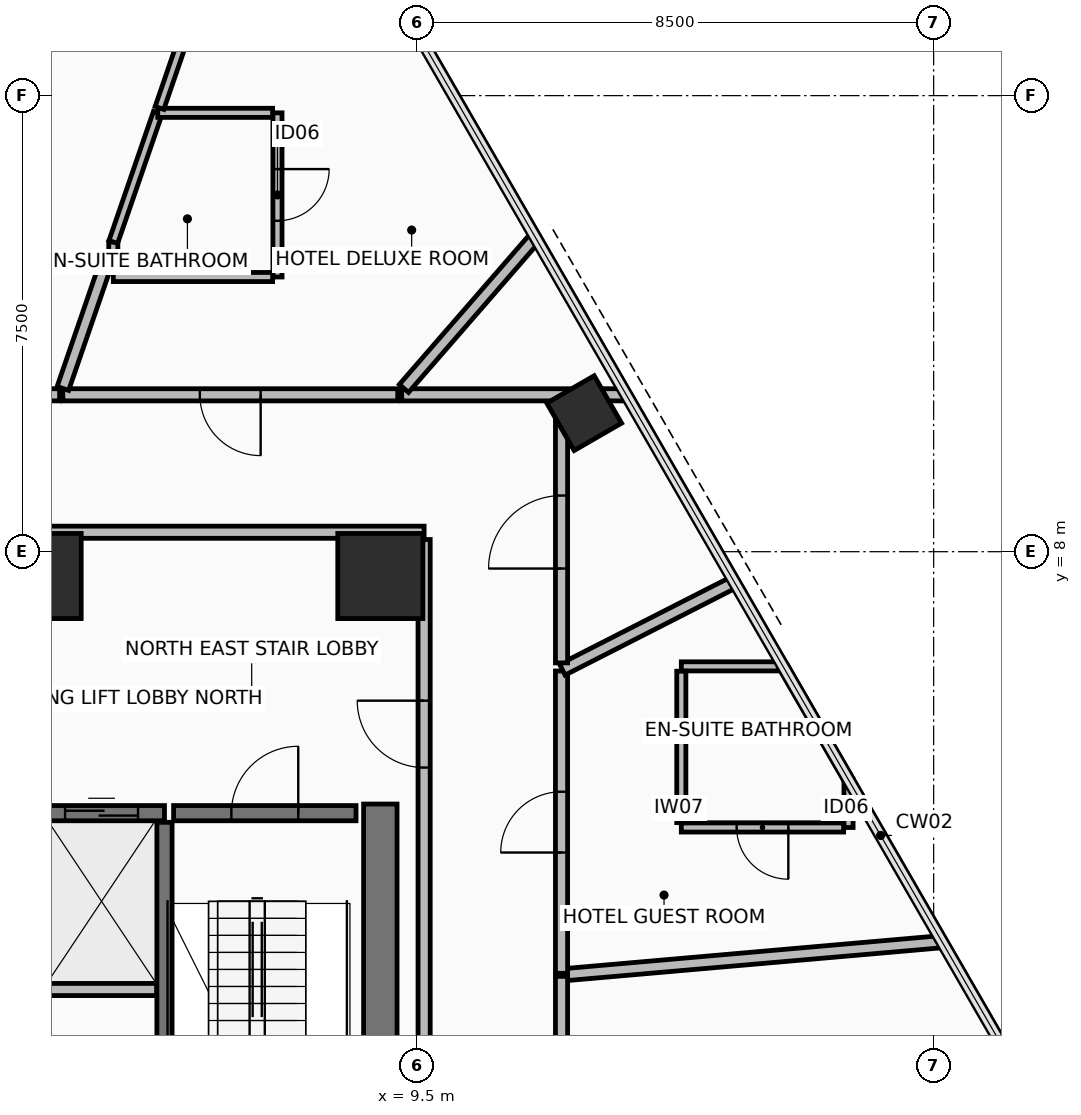
"""IFC4 building model, lengths in metres.
Left out: names, types, materials, properties, quantities, classifications, styles, units other than length and angle.
Written with IfcOpenShell. Run it as: python <this file> out.ifc"""

import sys

from ifc_helpers import new_model, si_unit, direction, frame, frame_2d, origin, origin_2d, place, context, subcontext, project, spatial, rectangle, hollow_rectangle, extrude, element, fill, save


model = new_model("IFC4")
c1 = context("Model", 3, precision=1e-05, world=origin(), true_north=direction((0.0, 1.0)))
c2 = subcontext(c1, "Body", "Model", "MODEL_VIEW")
j1 = project(units=[si_unit("LENGTHUNIT", "METRE"), si_unit("PLANEANGLEUNIT", "RADIAN")], contexts=[c1])
p1 = place(None, origin())
s1 = spatial("IfcSite", under=j1, at=p1, CompositionType="ELEMENT")
p2 = place(p1, origin())
s2 = spatial("IfcBuilding", under=s1, at=p2, CompositionType="ELEMENT")
p3 = place(p2, frame((0.0, 0.0, 38.65)))
s3 = spatial("IfcBuildingStorey", under=s2, at=p3, CompositionType="ELEMENT", Elevation=38.65)
for number, where, z_axis, x_axis in (
    (1, (8.9, 7.6, 0.0), (0.0, 0.0, 1.0), (1.0, 0.0, 0.0)),
    (2, (3.28, 7.6, 0.0), (0.0, 0.0, 1.0), (1.0, 0.0, 0.0)),
):
    element("IfcColumn", number, at=place(p3, frame(where, z_axis=z_axis, x_axis=x_axis)), inside=s3, PredefinedType="COLUMN", context=c2, shape_type="SweptSolid", body=[
        extrude(rectangle(XDim=1.4, YDim=1.4, at=origin_2d()), origin(), (0.0, 0.0, 1.0), 3.4),
    ])
p4 = place(p3, frame((12.252, 10.279, 0.0), z_axis=(0.0, 0.0, 1.0), x_axis=(-0.500001511499, 0.866024531118, 0.0)))
e3 = element("IfcColumn", 3, at=p4, inside=s3, PredefinedType="COLUMN", context=c2, shape_type="SweptSolid", body=[
    extrude(hollow_rectangle(XDim=0.9, YDim=0.9, WallThickness=0.05, at=origin_2d()), origin(), (0.0, 0.0, 1.0), 3.4),
])
p5 = place(p3, frame((8.9, -6.85, 0.0), z_axis=(0.0, 0.0, 1.0), x_axis=(0.0, 1.0, 0.0)))
e4 = element("IfcWall", 4, at=p5, inside=s3, PredefinedType="SHEAR", context=c2, shape_type="SweptSolid", body=[
    extrude(rectangle(XDim=10.7, YDim=0.55, at=frame_2d((5.35, 0.0))), origin(), (0.0, 0.0, 1.0), 3.225),
])
p6 = place(p3, frame((9.62, 8.32, 0.0), z_axis=(0.0, 0.0, 1.0), x_axis=(-1.0, 0.0, 0.0)))
e5 = element("IfcWall", 5, at=p6, inside=s3, PredefinedType="PARTITIONING", context=c2, shape_type="SweptSolid", body=[
    extrude(rectangle(XDim=19.24, YDim=0.2, at=frame_2d((9.62, 0.0))), origin(), (0.0, 0.0, 1.0), 2.57),
])
p7 = place(p6, frame((16.245, 0.0, 0.0)))
e6 = element("IfcOpeningElement", 6, at=p7, cuts=e5, PredefinedType="OPENING", context=c2, shape_type="SweptSolid", body=[
    extrude(rectangle(XDim=0.9, YDim=2.1, at=frame_2d((0.45, 1.05))), frame((0.0, 0.11, 0.0), z_axis=(0.0, -1.0, 0.0), x_axis=(1.0, 0.0, 0.0)), (0.0, 0.0, 1.0), 0.22),
])
p8 = place(p6, frame((14.295, 0.0, 0.0)))
e7 = element("IfcOpeningElement", 7, at=p8, cuts=e5, PredefinedType="OPENING", context=c2, shape_type="SweptSolid", body=[
    extrude(rectangle(XDim=0.9, YDim=2.1, at=frame_2d((0.45, 1.05))), frame((0.0, 0.11, 0.0), z_axis=(0.0, -1.0, 0.0), x_axis=(1.0, 0.0, 0.0)), (0.0, 0.0, 1.0), 0.22),
])
p9 = place(p3, frame((9.62, -8.2, 0.0), z_axis=(0.0, 0.0, 1.0), x_axis=(0.0, 1.0, 0.0)))
e8 = element("IfcWall", 8, at=p9, inside=s3, PredefinedType="PARTITIONING", context=c2, shape_type="SweptSolid", body=[
    extrude(rectangle(XDim=16.4, YDim=0.2, at=frame_2d((8.2, 0.0))), origin(), (0.0, 0.0, 1.0), 2.62),
])
p10 = place(p9, frame((12.65, 0.0, 0.0)))
e9 = element("IfcOpeningElement", 9, at=p10, cuts=e8, PredefinedType="OPENING", context=c2, shape_type="SweptSolid", body=[
    extrude(rectangle(XDim=1.1, YDim=2.15, at=frame_2d((0.55, 1.075))), frame((0.0, 0.11, 0.0), z_axis=(0.0, -1.0, 0.0), x_axis=(1.0, 0.0, 0.0)), (0.0, 0.0, 1.0), 0.22),
])
p11 = place(p3, frame((5.35, -3.75, 0.0), z_axis=(0.0, 0.0, 1.0), x_axis=(0.0, 1.0, 0.0)))
e10 = element("IfcWall", 10, at=p11, inside=s3, PredefinedType="SHEAR", context=c2, shape_type="SweptSolid", body=[
    extrude(rectangle(XDim=7.3, YDim=0.25, at=frame_2d((3.65, 0.0))), origin(), (0.0, 0.0, 1.0), 3.225),
])
p12 = place(p3, frame((5.5, 3.7, 0.0), z_axis=(0.0, 0.0, 1.0), x_axis=(1.0, 0.0, 0.0)))
e11 = element("IfcWall", 11, at=p12, inside=s3, PredefinedType="SHEAR", context=c2, shape_type="SweptSolid", body=[
    extrude(rectangle(XDim=3.0, YDim=0.25, at=frame_2d((1.5, 0.0))), origin(), (0.0, 0.0, 1.0), 3.225),
])
p13 = place(p12, frame((0.95, 0.0, 0.0)))
e12 = element("IfcOpeningElement", 12, at=p13, cuts=e11, PredefinedType="OPENING", context=c2, shape_type="SweptSolid", body=[
    extrude(rectangle(XDim=1.1, YDim=2.15, at=frame_2d((0.55, 1.075))), frame((0.0, 0.135, 0.0), z_axis=(0.0, -1.0, 0.0), x_axis=(1.0, 0.0, 0.0)), (0.0, 0.0, 1.0), 0.27),
])
p14 = place(p3, frame((3.28, 3.7, 0.0), z_axis=(0.0, 0.0, 1.0), x_axis=(1.0, 0.0, 0.0)))
e13 = element("IfcWall", 13, at=p14, inside=s3, PredefinedType="SHEAR", context=c2, shape_type="SweptSolid", body=[
    extrude(rectangle(XDim=2.07, YDim=0.25, at=frame_2d((1.035, 0.0))), origin(), (0.0, 0.0, 1.0), 3.225),
])
p15 = place(p14, frame((0.435, 0.0, 0.0)))
e14 = element("IfcOpeningElement", 14, at=p15, cuts=e13, PredefinedType="OPENING", context=c2, shape_type="SweptSolid", body=[
    extrude(rectangle(XDim=1.2, YDim=2.2, at=frame_2d((0.6, 1.1))), frame((0.0, 0.135, 0.0), z_axis=(0.0, -1.0, 0.0), x_axis=(1.0, 0.0, 0.0)), (0.0, 0.0, 1.0), 0.27),
])
p16 = place(p3, frame((3.385, 0.8, 0.0), z_axis=(0.0, 0.0, 1.0), x_axis=(1.0, 0.0, 0.0)))
e15 = element("IfcWall", 15, at=p16, inside=s3, PredefinedType="PARTITIONING", context=c2, shape_type="SweptSolid", body=[
    extrude(rectangle(XDim=1.835, YDim=0.2, at=frame_2d((0.917, 0.0))), origin(), (0.0, 0.0, 1.0), 3.225),
])
p17 = place(p3, frame((13.85, 6.114, 0.0), z_axis=(0.0, 0.0, 1.0), x_axis=(1.0, 0.0, 0.0)))
e16 = element("IfcWall", 16, at=p17, inside=s3, PredefinedType="PARTITIONING", context=c2, shape_type="SweptSolid", body=[
    extrude(rectangle(XDim=1.672, YDim=0.15, at=frame_2d((0.836, 0.0))), origin(), (0.0, 0.0, 1.0), 2.42),
])
p18 = place(p3, frame((15.522, 6.114, 0.0), z_axis=(0.0, 0.0, 1.0), x_axis=(0.500062410969, -0.865989367796, 0.0)))
e17 = element("IfcWall", 17, at=p18, inside=s3, PredefinedType="PARTITIONING", context=c2, shape_type="SweptSolid", body=[
    extrude(rectangle(XDim=2.155, YDim=0.15, at=frame_2d((1.078, 0.0))), origin(), (0.0, 0.0, 1.0), 3.225),
])
p19 = place(p3, frame((16.6, 4.248, 0.0), z_axis=(0.0, 0.0, 1.0), x_axis=(0.0, -1.0, 0.0)))
e18 = element("IfcWall", 18, at=p19, inside=s3, PredefinedType="PARTITIONING", context=c2, shape_type="SweptSolid", body=[
    extrude(rectangle(XDim=0.784, YDim=0.15, at=frame_2d((0.392, 0.0))), origin(), (0.0, 0.0, 1.0), 3.225),
])
p20 = place(p3, frame((16.52, 3.464, 0.0), z_axis=(0.0, 0.0, 1.0), x_axis=(-1.0, 0.0, 0.0)))
e19 = element("IfcWall", 19, at=p20, inside=s3, PredefinedType="PARTITIONING", context=c2, shape_type="SweptSolid", body=[
    extrude(rectangle(XDim=2.67, YDim=0.15, at=frame_2d((1.335, 0.0))), origin(), (0.0, 0.0, 1.0), 2.42),
])
p21 = place(p20, frame((0.91, 0.0, 0.0)))
e20 = element("IfcOpeningElement", 20, at=p21, cuts=e19, PredefinedType="OPENING", context=c2, shape_type="SweptSolid", body=[
    extrude(rectangle(XDim=0.85, YDim=2.1, at=frame_2d((0.425, 1.05))), frame((0.0, 0.085, 0.0), z_axis=(0.0, -1.0, 0.0), x_axis=(1.0, 0.0, 0.0)), (0.0, 0.0, 1.0), 0.17),
])
p22 = place(p3, frame((13.85, 3.544, 0.0), z_axis=(0.0, 0.0, 1.0), x_axis=(0.0, 1.0, 0.0)))
e21 = element("IfcWall", 21, at=p22, inside=s3, PredefinedType="PARTITIONING", context=c2, shape_type="SweptSolid", body=[
    extrude(rectangle(XDim=2.49, YDim=0.15, at=frame_2d((1.245, 0.0))), origin(), (0.0, 0.0, 1.0), 2.82),
])
p23 = place(p3, frame((7.208, 15.217, 0.0), z_axis=(0.0, 0.0, 1.0), x_axis=(0.0, -1.0, 0.0)))
e22 = element("IfcWall", 22, at=p23, inside=s3, PredefinedType="PARTITIONING", context=c2, shape_type="SweptSolid", body=[
    extrude(rectangle(XDim=2.7, YDim=0.15, at=frame_2d((1.35, 0.0))), origin(), (0.0, 0.0, 1.0), 2.82),
])
p24 = place(p23, frame((0.925, 0.0, 0.0)))
e23 = element("IfcOpeningElement", 23, at=p24, cuts=e22, PredefinedType="OPENING", context=c2, shape_type="SweptSolid", body=[
    extrude(rectangle(XDim=0.85, YDim=2.1, at=frame_2d((0.425, 1.05))), frame((0.0, 0.085, 0.0), z_axis=(0.0, -1.0, 0.0), x_axis=(1.0, 0.0, 0.0)), (0.0, 0.0, 1.0), 0.17),
])
p25 = place(p3, frame((7.128, 12.517, 0.0), z_axis=(0.0, 0.0, 1.0), x_axis=(-1.0, 0.0, 0.0)))
e24 = element("IfcWall", 24, at=p25, inside=s3, PredefinedType="PARTITIONING", context=c2, shape_type="SweptSolid", body=[
    extrude(rectangle(XDim=2.62, YDim=0.15, at=frame_2d((1.31, 0.0))), origin(), (0.0, 0.0, 1.0), 2.82),
])
p26 = place(p3, frame((4.508, 12.597, 0.0), z_axis=(0.0, 0.0, 1.0), x_axis=(0.0, 1.0, 0.0)))
e25 = element("IfcWall", 25, at=p26, inside=s3, PredefinedType="PARTITIONING", context=c2, shape_type="SweptSolid", body=[
    extrude(rectangle(XDim=0.496, YDim=0.15, at=frame_2d((0.248, 0.0))), origin(), (0.0, 0.0, 1.0), 3.225),
])
p27 = place(p3, frame((4.508, 13.093, 0.0), z_axis=(0.0, 0.0, 1.0), x_axis=(0.325635598236, 0.945495350153, 0.0)))
e26 = element("IfcWall", 26, at=p27, inside=s3, PredefinedType="PARTITIONING", context=c2, shape_type="SweptSolid", body=[
    extrude(rectangle(XDim=2.246, YDim=0.15, at=frame_2d((1.123, 0.0))), origin(), (0.0, 0.0, 1.0), 2.82),
])
p28 = place(p3, frame((5.24, 15.217, 0.0), z_axis=(0.0, 0.0, 1.0), x_axis=(1.0, 0.0, 0.0)))
e27 = element("IfcWall", 27, at=p28, inside=s3, PredefinedType="PARTITIONING", context=c2, shape_type="SweptSolid", body=[
    extrude(rectangle(XDim=1.889, YDim=0.15, at=frame_2d((0.944, 0.0))), origin(), (0.0, 0.0, 1.0), 2.82),
])
p29 = place(p3, frame((18.136, 1.587, 0.0), z_axis=(0.0, 0.0, 1.0), x_axis=(-0.99619562433, -0.087145155144, 0.0)))
e28 = element("IfcWall", 28, at=p29, inside=s3, PredefinedType="PARTITIONING", context=c2, shape_type="SweptSolid", body=[
    extrude(rectangle(XDim=6.253, YDim=0.2, at=frame_2d((3.126, 0.0))), origin(), (0.0, 0.0, 1.0), 2.42),
])
p30 = place(p3, frame((11.88, 1.067, 0.0), z_axis=(0.0, 0.0, 1.0), x_axis=(0.0, 1.0, 0.0)))
e29 = element("IfcWall", 29, at=p30, inside=s3, PredefinedType="PARTITIONING", context=c2, shape_type="SweptSolid", body=[
    extrude(rectangle(XDim=4.971, YDim=0.2, at=frame_2d((2.486, 0.0))), origin(), (0.0, 0.0, 1.0), 2.82),
])
p31 = place(p30, frame((1.986, 0.0, 0.0)))
e30 = element("IfcOpeningElement", 30, at=p31, cuts=e29, PredefinedType="OPENING", context=c2, shape_type="SweptSolid", body=[
    extrude(rectangle(XDim=1.0, YDim=2.15, at=frame_2d((0.5, 1.075))), frame((0.0, 0.11, 0.0), z_axis=(0.0, -1.0, 0.0), x_axis=(1.0, 0.0, 0.0)), (0.0, 0.0, 1.0), 0.22),
])
p32 = place(p3, frame((11.894, 6.06, 0.0), z_axis=(0.0, 0.0, 1.0), x_axis=(0.89097561597, 0.454051155429, 0.0)))
e31 = element("IfcWall", 31, at=p32, inside=s3, PredefinedType="PARTITIONING", context=c2, shape_type="SweptSolid", body=[
    extrude(rectangle(XDim=3.15, YDim=0.2, at=frame_2d((1.575, 0.0))), origin(), (0.0, 0.0, 1.0), 2.42),
])
p33 = place(p3, frame((12.944, 10.58, 0.0), z_axis=(0.0, 0.0, 1.0), x_axis=(-1.0, 0.0, 0.0)))
e32 = element("IfcWall", 32, at=p33, inside=s3, PredefinedType="PARTITIONING", context=c2, shape_type="SweptSolid", body=[
    extrude(rectangle(XDim=3.692, YDim=0.2, at=frame_2d((1.846, 0.0))), origin(), (0.0, 0.0, 1.0), 2.42),
])
p34 = place(p3, frame((9.288, 10.685, 0.0), z_axis=(0.0, 0.0, 1.0), x_axis=(0.656044714013, 0.754722023805, 0.0)))
e33 = element("IfcWall", 33, at=p34, inside=s3, PredefinedType="PARTITIONING", context=c2, shape_type="SweptSolid", body=[
    extrude(rectangle(XDim=3.293, YDim=0.2, at=frame_2d((1.646, 0.0))), origin(), (0.0, 0.0, 1.0), 2.42),
])
p35 = place(p3, frame((11.88, 6.171, 0.0), z_axis=(0.0, 0.0, 1.0), x_axis=(0.0, 1.0, 0.0)))
e34 = element("IfcWall", 34, at=p35, inside=s3, PredefinedType="PARTITIONING", context=c2, shape_type="SweptSolid", body=[
    extrude(rectangle(XDim=4.304, YDim=0.2, at=frame_2d((2.152, 0.0))), origin(), (0.0, 0.0, 1.0), 2.42),
])
p36 = place(p35, frame((1.552, 0.0, 0.0)))
e35 = element("IfcOpeningElement", 35, at=p36, cuts=e34, PredefinedType="OPENING", context=c2, shape_type="SweptSolid", body=[
    extrude(rectangle(XDim=1.2, YDim=2.15, at=frame_2d((0.6, 1.075))), frame((0.0, 0.11, 0.0), z_axis=(0.0, -1.0, 0.0), x_axis=(1.0, 0.0, 0.0)), (0.0, 0.0, 1.0), 0.22),
])
p37 = place(p3, frame((9.186, 10.58, 0.0), z_axis=(0.0, 0.0, 1.0), x_axis=(-1.0, 0.0, 0.0)))
e36 = element("IfcWall", 36, at=p37, inside=s3, PredefinedType="PARTITIONING", context=c2, shape_type="SweptSolid", body=[
    extrude(rectangle(XDim=5.508, YDim=0.2, at=frame_2d((2.754, 0.0))), origin(), (0.0, 0.0, 1.0), 2.82),
])
p38 = place(p37, frame((2.254, 0.0, 0.0)))
e37 = element("IfcOpeningElement", 37, at=p38, cuts=e36, PredefinedType="OPENING", context=c2, shape_type="SweptSolid", body=[
    extrude(rectangle(XDim=1.0, YDim=2.15, at=frame_2d((0.5, 1.075))), frame((0.0, 0.11, 0.0), z_axis=(0.0, -1.0, 0.0), x_axis=(1.0, 0.0, 0.0)), (0.0, 0.0, 1.0), 0.22),
])
p39 = place(p3, frame((3.679, 10.685, 0.0), z_axis=(0.0, 0.0, 1.0), x_axis=(0.325506719361, 0.945539727167, 0.0)))
e38 = element("IfcWall", 38, at=p39, inside=s3, PredefinedType="PARTITIONING", context=c2, shape_type="SweptSolid", body=[
    extrude(rectangle(XDim=2.301, YDim=0.2, at=frame_2d((1.15, 0.0))), origin(), (0.0, 0.0, 1.0), 3.225),
])
p40 = place(p3, frame((5.267, 15.297, 0.0), z_axis=(0.0, 0.0, 1.0), x_axis=(0.325605473746, 0.945505724714, 0.0)))
e39 = element("IfcWall", 39, at=p40, inside=s3, PredefinedType="PARTITIONING", context=c2, shape_type="SweptSolid", body=[
    extrude(rectangle(XDim=5.684, YDim=0.15, at=frame_2d((2.842, 0.0))), origin(), (0.0, 0.0, 1.0), 2.42),
])
p41 = place(p3, frame((3.625, 10.58, 0.0), z_axis=(0.0, 0.0, 1.0), x_axis=(-1.0, 0.0, 0.0)))
e40 = element("IfcWall", 40, at=p41, inside=s3, PredefinedType="PARTITIONING", context=c2, shape_type="SweptSolid", body=[
    extrude(rectangle(XDim=4.528, YDim=0.2, at=frame_2d((2.264, 0.0))), origin(), (0.0, 0.0, 1.0), 2.57),
])
p42 = place(p41, frame((1.664, 0.0, 0.0)))
e41 = element("IfcOpeningElement", 41, at=p42, cuts=e40, PredefinedType="OPENING", context=c2, shape_type="SweptSolid", body=[
    extrude(rectangle(XDim=1.2, YDim=2.15, at=frame_2d((0.6, 1.075))), frame((0.0, 0.11, 0.0), z_axis=(0.0, -1.0, 0.0), x_axis=(1.0, 0.0, 0.0)), (0.0, 0.0, 1.0), 0.22),
])
p43 = place(p3, frame((11.88, -3.842, 0.0), z_axis=(0.0, 0.0, 1.0), x_axis=(0.0, 1.0, 0.0)))
e42 = element("IfcWall", 42, at=p43, inside=s3, PredefinedType="PARTITIONING", context=c2, shape_type="SweptSolid", body=[
    extrude(rectangle(XDim=4.858, YDim=0.2, at=frame_2d((2.429, 0.0))), origin(), (0.0, 0.0, 1.0), 3.225),
])
p44 = place(p43, frame((1.829, 0.0, 0.0)))
e43 = element("IfcOpeningElement", 43, at=p44, cuts=e42, PredefinedType="OPENING", context=c2, shape_type="SweptSolid", body=[
    extrude(rectangle(XDim=1.2, YDim=2.15, at=frame_2d((0.6, 1.075))), frame((0.0, 0.11, 0.0), z_axis=(0.0, -1.0, 0.0), x_axis=(1.0, 0.0, 0.0)), (0.0, 0.0, 1.0), 0.22),
])
p45 = place(p10, frame((1.1, 0.0, 0.0), z_axis=(0.0, 0.0, 1.0), x_axis=(-1.0, 0.0, 0.0)))
e44 = element("IfcDoor", 44, at=p45, inside=s3, OperationType="SINGLE_SWING_LEFT", PredefinedType="DOOR", context=c2, shape_type="SweptSolid", body=[
    extrude(rectangle(XDim=1.1, YDim=2.15, at=frame_2d((0.55, 1.075))), frame((0.0, 0.025, 0.0), z_axis=(0.0, -1.0, 0.0), x_axis=(1.0, 0.0, 0.0)), (0.0, 0.0, 1.0), 0.05),
])
fill(e9, e44)
p46 = place(p13, frame((1.1, 0.0, 0.0), z_axis=(0.0, 0.0, 1.0), x_axis=(-1.0, 0.0, 0.0)))
e45 = element("IfcDoor", 45, at=p46, inside=s3, OperationType="SINGLE_SWING_LEFT", PredefinedType="DOOR", context=c2, shape_type="SweptSolid", body=[
    extrude(rectangle(XDim=1.1, YDim=2.15, at=frame_2d((0.55, 1.075))), frame((0.0, 0.025, 0.0), z_axis=(0.0, -1.0, 0.0), x_axis=(1.0, 0.0, 0.0)), (0.0, 0.0, 1.0), 0.05),
])
fill(e12, e45)
p47 = place(p15, origin())
e46 = element("IfcDoor", 46, at=p47, inside=s3, OperationType="SLIDING_TO_RIGHT", PredefinedType="DOOR", context=c2, shape_type="SweptSolid", body=[
    extrude(rectangle(XDim=1.2, YDim=2.2, at=frame_2d((0.6, 1.1))), frame((0.0, 0.025, 0.0), z_axis=(0.0, -1.0, 0.0), x_axis=(1.0, 0.0, 0.0)), (0.0, 0.0, 1.0), 0.05),
])
fill(e14, e46)
p48 = place(p21, origin())
e47 = element("IfcDoor", 47, at=p48, inside=s3, OperationType="SINGLE_SWING_RIGHT", PredefinedType="DOOR", context=c2, shape_type="SweptSolid", body=[
    extrude(rectangle(XDim=0.85, YDim=2.1, at=frame_2d((0.425, 1.05))), frame((0.0, 0.025, 0.0), z_axis=(0.0, -1.0, 0.0), x_axis=(1.0, 0.0, 0.0)), (0.0, 0.0, 1.0), 0.05),
])
fill(e20, e47)
p49 = place(p24, origin())
e48 = element("IfcDoor", 48, at=p49, inside=s3, OperationType="SINGLE_SWING_RIGHT", PredefinedType="DOOR", context=c2, shape_type="SweptSolid", body=[
    extrude(rectangle(XDim=0.85, YDim=2.1, at=frame_2d((0.425, 1.05))), frame((0.0, 0.025, 0.0), z_axis=(0.0, -1.0, 0.0), x_axis=(1.0, 0.0, 0.0)), (0.0, 0.0, 1.0), 0.05),
])
fill(e23, e48)
p50 = place(p31, origin())
e49 = element("IfcDoor", 49, at=p50, inside=s3, OperationType="SINGLE_SWING_LEFT", PredefinedType="DOOR", context=c2, shape_type="SweptSolid", body=[
    extrude(rectangle(XDim=1.0, YDim=2.15, at=frame_2d((0.5, 1.075))), frame((0.0, 0.025, 0.0), z_axis=(0.0, -1.0, 0.0), x_axis=(1.0, 0.0, 0.0)), (0.0, 0.0, 1.0), 0.05),
])
fill(e30, e49)
p51 = place(p36, origin())
e50 = element("IfcDoor", 50, at=p51, inside=s3, OperationType="SINGLE_SWING_LEFT", PredefinedType="DOOR", context=c2, shape_type="SweptSolid", body=[
    extrude(rectangle(XDim=1.2, YDim=2.15, at=frame_2d((0.6, 1.075))), frame((0.0, 0.025, 0.0), z_axis=(0.0, -1.0, 0.0), x_axis=(1.0, 0.0, 0.0)), (0.0, 0.0, 1.0), 0.05),
])
fill(e35, e50)
p52 = place(p38, origin())
e51 = element("IfcDoor", 51, at=p52, inside=s3, OperationType="SINGLE_SWING_LEFT", PredefinedType="DOOR", context=c2, shape_type="SweptSolid", body=[
    extrude(rectangle(XDim=1.0, YDim=2.15, at=frame_2d((0.5, 1.075))), frame((0.0, 0.025, 0.0), z_axis=(0.0, -1.0, 0.0), x_axis=(1.0, 0.0, 0.0)), (0.0, 0.0, 1.0), 0.05),
])
fill(e37, e51)
save(model, sys.argv[1])
